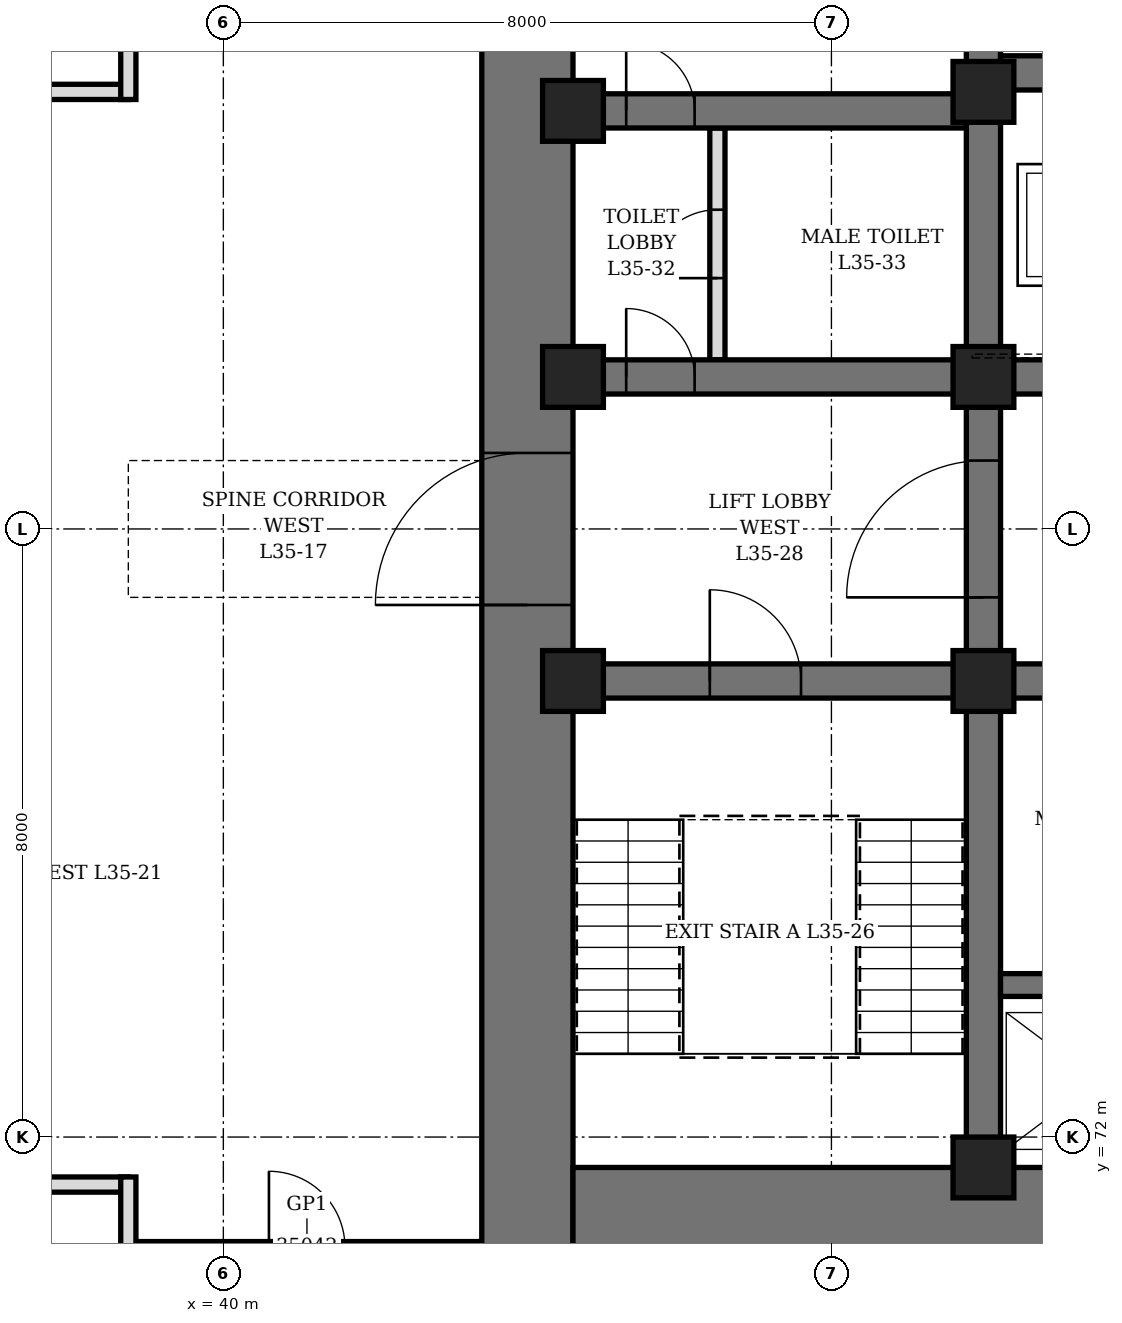
"""IFC4 building model, lengths in metres.
Left out: names, types, materials, properties, quantities, classifications, styles, units other than length and angle.
Written with IfcOpenShell. Run it as: python <this file> out.ifc"""

import sys

from ifc_helpers import new_model, si_unit, direction, frame, frame_2d, origin, origin_2d, place, context, subcontext, project, spatial, rectangle, hollow_rectangle, extrude, element, fill, save


model = new_model("IFC4")
c1 = context("Model", 3, precision=1e-05, world=origin(), true_north=direction((0.0, 1.0)))
c2 = subcontext(c1, "Body", "Model", "MODEL_VIEW")
j1 = project(units=[si_unit("LENGTHUNIT", "METRE"), si_unit("PLANEANGLEUNIT", "RADIAN")], contexts=[c1])
p1 = place(None, origin())
s1 = spatial("IfcSite", under=j1, at=p1, CompositionType="ELEMENT")
p2 = place(p1, origin())
s2 = spatial("IfcBuilding", under=s1, at=p2, CompositionType="ELEMENT")
p3 = place(p2, frame((0.0, 0.0, 158.5)))
s3 = spatial("IfcBuildingStorey", under=s2, at=p3, CompositionType="ELEMENT", Elevation=158.5)
p4 = place(p3, frame((44.0, 70.4, 0.0), z_axis=(0.0, 0.0, 1.0), x_axis=(0.0, 1.0, 0.0)))
e1 = element("IfcWall", 1, at=p4, inside=s3, PredefinedType="SHEAR", context=c2, shape_type="SweptSolid", body=[
    extrude(rectangle(XDim=19.2, YDim=1.2, at=frame_2d((9.6, 0.0))), origin(), (0.0, 0.0, 1.0), 4.2),
])
p5 = place(p4, frame((8.6, 0.0, 0.0)))
e2 = element("IfcOpeningElement", 2, at=p5, cuts=e1, PredefinedType="OPENING", context=c2, shape_type="SweptSolid", body=[
    extrude(rectangle(XDim=2.0, YDim=2.4, at=frame_2d((1.0, 1.2))), frame((0.0, 0.61, 0.0), z_axis=(0.0, -1.0, 0.0), x_axis=(1.0, 0.0, 0.0)), (0.0, 0.0, 1.0), 1.22),
])
p6 = place(p3, frame((44.6, 71.0, 0.0), z_axis=(0.0, 0.0, 1.0), x_axis=(1.0, 0.0, 0.0)))
e3 = element("IfcWall", 3, at=p6, inside=s3, PredefinedType="SHEAR", context=c2, shape_type="SweptSolid", body=[
    extrude(rectangle(XDim=22.8, YDim=1.2, at=frame_2d((11.4, 0.0))), origin(), (0.0, 0.0, 1.0), 4.2),
])
p7 = place(p3, frame((50.0, 71.6, 0.0), z_axis=(0.0, 0.0, 1.0), x_axis=(0.0, 1.0, 0.0)))
e4 = element("IfcWall", 4, at=p7, inside=s3, PredefinedType="SHEAR", context=c2, shape_type="SweptSolid", body=[
    extrude(rectangle(XDim=16.8, YDim=0.45, at=frame_2d((8.4, 0.0))), origin(), (0.0, 0.0, 1.0), 4.2),
])
p8 = place(p7, frame((7.5, 0.0, 0.0)))
e5 = element("IfcOpeningElement", 5, at=p8, cuts=e4, PredefinedType="OPENING", context=c2, shape_type="SweptSolid", body=[
    extrude(rectangle(XDim=1.8, YDim=2.4, at=frame_2d((0.9, 1.2))), frame((0.0, 0.235, 0.0), z_axis=(0.0, -1.0, 0.0), x_axis=(1.0, 0.0, 0.0)), (0.0, 0.0, 1.0), 0.47),
])
p9 = place(p3, frame((44.6, 78.0, 0.0), z_axis=(0.0, 0.0, 1.0), x_axis=(1.0, 0.0, 0.0)))
e6 = element("IfcWall", 6, at=p9, inside=s3, PredefinedType="SHEAR", context=c2, shape_type="SweptSolid", body=[
    extrude(rectangle(XDim=5.175, YDim=0.45, at=frame_2d((2.587, 0.0))), origin(), (0.0, 0.0, 1.0), 4.2),
])
p10 = place(p9, frame((1.8, 0.0, 0.0)))
e7 = element("IfcOpeningElement", 7, at=p10, cuts=e6, PredefinedType="OPENING", context=c2, shape_type="SweptSolid", body=[
    extrude(rectangle(XDim=1.2, YDim=2.1, at=frame_2d((0.6, 1.05))), frame((0.0, 0.235, 0.0), z_axis=(0.0, -1.0, 0.0), x_axis=(1.0, 0.0, 0.0)), (0.0, 0.0, 1.0), 0.47),
])
p11 = place(p3, frame((44.6, 82.0, 0.0), z_axis=(0.0, 0.0, 1.0), x_axis=(1.0, 0.0, 0.0)))
e8 = element("IfcWall", 8, at=p11, inside=s3, PredefinedType="SHEAR", context=c2, shape_type="SweptSolid", body=[
    extrude(rectangle(XDim=5.175, YDim=0.45, at=frame_2d((2.587, 0.0))), origin(), (0.0, 0.0, 1.0), 4.2),
])
p12 = place(p11, frame((0.7, 0.0, 0.0)))
e9 = element("IfcOpeningElement", 9, at=p12, cuts=e8, PredefinedType="OPENING", context=c2, shape_type="SweptSolid", body=[
    extrude(rectangle(XDim=0.9, YDim=2.1, at=frame_2d((0.45, 1.05))), frame((0.0, 0.235, 0.0), z_axis=(0.0, -1.0, 0.0), x_axis=(1.0, 0.0, 0.0)), (0.0, 0.0, 1.0), 0.47),
])
p13 = place(p3, frame((44.6, 85.5, 0.0), z_axis=(0.0, 0.0, 1.0), x_axis=(1.0, 0.0, 0.0)))
e10 = element("IfcWall", 10, at=p13, inside=s3, PredefinedType="SHEAR", context=c2, shape_type="SweptSolid", body=[
    extrude(rectangle(XDim=5.175, YDim=0.45, at=frame_2d((2.587, 0.0))), origin(), (0.0, 0.0, 1.0), 4.2),
])
p14 = place(p13, frame((0.7, 0.0, 0.0)))
e11 = element("IfcOpeningElement", 11, at=p14, cuts=e10, PredefinedType="OPENING", context=c2, shape_type="SweptSolid", body=[
    extrude(rectangle(XDim=0.9, YDim=2.1, at=frame_2d((0.45, 1.05))), frame((0.0, 0.235, 0.0), z_axis=(0.0, -1.0, 0.0), x_axis=(1.0, 0.0, 0.0)), (0.0, 0.0, 1.0), 0.47),
])
p15 = place(p3, frame((50.225, 78.0, 0.0), z_axis=(0.0, 0.0, 1.0), x_axis=(1.0, 0.0, 0.0)))
e12 = element("IfcWall", 12, at=p15, inside=s3, PredefinedType="SHEAR", context=c2, shape_type="SweptSolid", body=[
    extrude(rectangle(XDim=11.55, YDim=0.45, at=frame_2d((5.775, 0.0))), origin(), (0.0, 0.0, 1.0), 4.2),
])
p16 = place(p15, frame((0.825, 0.0, 0.0)))
e13 = element("IfcOpeningElement", 13, at=p16, cuts=e12, PredefinedType="OPENING", context=c2, shape_type="SweptSolid", body=[
    extrude(rectangle(XDim=0.9, YDim=2.1, at=frame_2d((0.45, 1.05))), frame((0.0, 0.235, 0.0), z_axis=(0.0, -1.0, 0.0), x_axis=(1.0, 0.0, 0.0)), (0.0, 0.0, 1.0), 0.47),
])
p17 = place(p15, frame((3.825, 0.0, 0.0)))
e14 = element("IfcOpeningElement", 14, at=p17, cuts=e12, PredefinedType="OPENING", context=c2, shape_type="SweptSolid", body=[
    extrude(rectangle(XDim=0.9, YDim=2.1, at=frame_2d((0.45, 1.05))), frame((0.0, 0.235, 0.0), z_axis=(0.0, -1.0, 0.0), x_axis=(1.0, 0.0, 0.0)), (0.0, 0.0, 1.0), 0.47),
])
p18 = place(p15, frame((6.825, 0.0, 0.0)))
e15 = element("IfcOpeningElement", 15, at=p18, cuts=e12, PredefinedType="OPENING", context=c2, shape_type="SweptSolid", body=[
    extrude(rectangle(XDim=0.9, YDim=2.1, at=frame_2d((0.45, 1.05))), frame((0.0, 0.235, 0.0), z_axis=(0.0, -1.0, 0.0), x_axis=(1.0, 0.0, 0.0)), (0.0, 0.0, 1.0), 0.47),
])
p19 = place(p15, frame((9.825, 0.0, 0.0)))
e16 = element("IfcOpeningElement", 16, at=p19, cuts=e12, PredefinedType="OPENING", context=c2, shape_type="SweptSolid", body=[
    extrude(rectangle(XDim=0.9, YDim=2.1, at=frame_2d((0.45, 1.05))), frame((0.0, 0.235, 0.0), z_axis=(0.0, -1.0, 0.0), x_axis=(1.0, 0.0, 0.0)), (0.0, 0.0, 1.0), 0.47),
])
p20 = place(p3, frame((50.225, 82.0, 0.0), z_axis=(0.0, 0.0, 1.0), x_axis=(1.0, 0.0, 0.0)))
e17 = element("IfcWall", 17, at=p20, inside=s3, PredefinedType="SHEAR", context=c2, shape_type="SweptSolid", body=[
    extrude(rectangle(XDim=11.55, YDim=0.45, at=frame_2d((5.775, 0.0))), origin(), (0.0, 0.0, 1.0), 4.2),
])
p21 = place(p20, frame((0.725, 0.0, 0.0)))
e18 = element("IfcOpeningElement", 18, at=p21, cuts=e17, PredefinedType="OPENING", context=c2, shape_type="SweptSolid", body=[
    extrude(rectangle(XDim=1.1, YDim=2.2, at=frame_2d((0.55, 1.1))), frame((0.0, 0.235, 0.0), z_axis=(0.0, -1.0, 0.0), x_axis=(1.0, 0.0, 0.0)), (0.0, 0.0, 1.0), 0.47),
])
p22 = place(p20, frame((3.725, 0.0, 0.0)))
e19 = element("IfcOpeningElement", 19, at=p22, cuts=e17, PredefinedType="OPENING", context=c2, shape_type="SweptSolid", body=[
    extrude(rectangle(XDim=1.1, YDim=2.2, at=frame_2d((0.55, 1.1))), frame((0.0, 0.235, 0.0), z_axis=(0.0, -1.0, 0.0), x_axis=(1.0, 0.0, 0.0)), (0.0, 0.0, 1.0), 0.47),
])
p23 = place(p20, frame((6.725, 0.0, 0.0)))
e20 = element("IfcOpeningElement", 20, at=p23, cuts=e17, PredefinedType="OPENING", context=c2, shape_type="SweptSolid", body=[
    extrude(rectangle(XDim=1.1, YDim=2.2, at=frame_2d((0.55, 1.1))), frame((0.0, 0.235, 0.0), z_axis=(0.0, -1.0, 0.0), x_axis=(1.0, 0.0, 0.0)), (0.0, 0.0, 1.0), 0.47),
])
p24 = place(p20, frame((9.725, 0.0, 0.0)))
e21 = element("IfcOpeningElement", 21, at=p24, cuts=e17, PredefinedType="OPENING", context=c2, shape_type="SweptSolid", body=[
    extrude(rectangle(XDim=1.1, YDim=2.2, at=frame_2d((0.55, 1.1))), frame((0.0, 0.235, 0.0), z_axis=(0.0, -1.0, 0.0), x_axis=(1.0, 0.0, 0.0)), (0.0, 0.0, 1.0), 0.47),
])
p25 = place(p3, frame((50.225, 86.0, 0.0), z_axis=(0.0, 0.0, 1.0), x_axis=(1.0, 0.0, 0.0)))
e22 = element("IfcWall", 22, at=p25, inside=s3, PredefinedType="SHEAR", context=c2, shape_type="SweptSolid", body=[
    extrude(rectangle(XDim=11.55, YDim=0.45, at=frame_2d((5.775, 0.0))), origin(), (0.0, 0.0, 1.0), 4.2),
])
p26 = place(p3, frame((50.225, 74.0, 0.0), z_axis=(0.0, 0.0, 1.0), x_axis=(1.0, 0.0, 0.0)))
e23 = element("IfcWall", 23, at=p26, inside=s3, PredefinedType="SHEAR", context=c2, shape_type="SweptSolid", body=[
    extrude(rectangle(XDim=11.55, YDim=0.3, at=frame_2d((5.775, 0.0))), origin(), (0.0, 0.0, 1.0), 4.2),
])
for number, where, z_axis, x_axis in (
    (24, (44.6, 78.0, 0.0), (0.0, 0.0, 1.0), (1.0, 0.0, 0.0)),
    (25, (44.6, 82.0, 0.0), (0.0, 0.0, 1.0), (1.0, 0.0, 0.0)),
    (26, (44.6, 85.5, 0.0), (0.0, 0.0, 1.0), (1.0, 0.0, 0.0)),
    (27, (50.0, 71.6, 0.0), (0.0, 0.0, 1.0), (1.0, 0.0, 0.0)),
    (28, (50.0, 78.0, 0.0), (0.0, 0.0, 1.0), (1.0, 0.0, 0.0)),
    (29, (50.0, 82.0, 0.0), (0.0, 0.0, 1.0), (1.0, 0.0, 0.0)),
    (30, (50.0, 85.75, 0.0), (0.0, 0.0, 1.0), (1.0, 0.0, 0.0)),
):
    element("IfcColumn", number, at=place(p3, frame(where, z_axis=z_axis, x_axis=x_axis)), inside=s3, PredefinedType="COLUMN", context=c2, shape_type="SweptSolid", body=[
        extrude(hollow_rectangle(XDim=0.8, YDim=0.8, WallThickness=0.1, at=origin_2d()), origin(), (0.0, 0.0, 1.0), 4.2),
    ])
p27 = place(p3, frame((46.5, 82.225, 0.0), z_axis=(0.0, 0.0, 1.0), x_axis=(0.0, 1.0, 0.0)))
e31 = element("IfcWall", 31, at=p27, inside=s3, PredefinedType="PARTITIONING", context=c2, shape_type="SweptSolid", body=[
    extrude(rectangle(XDim=3.05, YDim=0.2, at=frame_2d((1.525, 0.0))), origin(), (0.0, 0.0, 1.0), 4.04),
])
p28 = place(p27, frame((1.075, 0.0, 0.0)))
e32 = element("IfcOpeningElement", 32, at=p28, cuts=e31, PredefinedType="OPENING", context=c2, shape_type="SweptSolid", body=[
    extrude(rectangle(XDim=0.9, YDim=2.1, at=frame_2d((0.45, 1.05))), frame((0.0, 0.11, 0.0), z_axis=(0.0, -1.0, 0.0), x_axis=(1.0, 0.0, 0.0)), (0.0, 0.0, 1.0), 0.22),
])
for number, where, z_axis, x_axis in (
    (33, (33.95, 71.375, 0.0), (0.0, 0.0, 1.0), (1.0, 0.0, 0.0)),
    (34, (33.95, 85.75, 0.0), (0.0, 0.0, 1.0), (1.0, 0.0, 0.0)),
):
    element("IfcWall", number, at=place(p3, frame(where, z_axis=z_axis, x_axis=x_axis)), inside=s3, PredefinedType="PARTITIONING", context=c2, shape_type="SweptSolid", body=[
        extrude(rectangle(XDim=4.8, YDim=0.2, at=frame_2d((2.4, 0.0))), origin(), (0.0, 0.0, 1.0), 3.428),
    ])
p29 = place(p3, frame((38.8, 70.55, 0.0), z_axis=(0.0, 0.0, 1.0), x_axis=(1.0, 0.0, 0.0)))
e35 = element("IfcWall", 35, at=p29, inside=s3, PredefinedType="PARTITIONING", context=c2, shape_type="SweptSolid", body=[
    extrude(rectangle(XDim=4.6, YDim=0.15, at=frame_2d((2.3, 0.0))), origin(), (0.0, 0.0, 1.0), 4.04),
])
p30 = place(p29, frame((1.8, 0.0, 0.0)))
e36 = element("IfcOpeningElement", 36, at=p30, cuts=e35, PredefinedType="OPENING", context=c2, shape_type="SweptSolid", body=[
    extrude(rectangle(XDim=1.0, YDim=2.4, at=frame_2d((0.5, 1.2))), frame((0.0, 0.085, 0.0), z_axis=(0.0, -1.0, 0.0), x_axis=(1.0, 0.0, 0.0)), (0.0, 0.0, 1.0), 0.17),
])
p31 = place(p3, frame((38.75, 63.2, 0.0), z_axis=(0.0, 0.0, 1.0), x_axis=(0.0, 1.0, 0.0)))
e37 = element("IfcWall", 37, at=p31, inside=s3, PredefinedType="PARTITIONING", context=c2, shape_type="SweptSolid", body=[
    extrude(rectangle(XDim=8.275, YDim=0.2, at=frame_2d((4.138, 0.0))), origin(), (0.0, 0.0, 1.0), 4.04),
])
p32 = place(p31, frame((0.488, 0.0, 0.0)))
e38 = element("IfcOpeningElement", 38, at=p32, cuts=e37, PredefinedType="OPENING", context=c2, shape_type="SweptSolid", body=[
    extrude(rectangle(XDim=1.0, YDim=2.1, at=frame_2d((0.5, 1.05))), frame((0.0, 0.11, 0.0), z_axis=(0.0, -1.0, 0.0), x_axis=(1.0, 0.0, 0.0)), (0.0, 0.0, 1.0), 0.22),
])
p33 = place(p31, frame((6.05, 0.0, 0.0)))
e39 = element("IfcOpeningElement", 39, at=p33, cuts=e37, PredefinedType="OPENING", context=c2, shape_type="SweptSolid", body=[
    extrude(rectangle(XDim=1.0, YDim=2.1, at=frame_2d((0.5, 1.05))), frame((0.0, 0.11, 0.0), z_axis=(0.0, -1.0, 0.0), x_axis=(1.0, 0.0, 0.0)), (0.0, 0.0, 1.0), 0.22),
])
p34 = place(p3, frame((38.75, 85.65, 0.0), z_axis=(0.0, 0.0, 1.0), x_axis=(0.0, 1.0, 0.0)))
e40 = element("IfcWall", 40, at=p34, inside=s3, PredefinedType="PARTITIONING", context=c2, shape_type="SweptSolid", body=[
    extrude(rectangle(XDim=8.725, YDim=0.2, at=frame_2d((4.363, 0.0))), origin(), (0.0, 0.0, 1.0), 4.04),
])
p35 = place(p34, frame((1.038, 0.0, 0.0)))
e41 = element("IfcOpeningElement", 41, at=p35, cuts=e40, PredefinedType="OPENING", context=c2, shape_type="SweptSolid", body=[
    extrude(rectangle(XDim=1.0, YDim=2.1, at=frame_2d((0.5, 1.05))), frame((0.0, 0.11, 0.0), z_axis=(0.0, -1.0, 0.0), x_axis=(1.0, 0.0, 0.0)), (0.0, 0.0, 1.0), 0.22),
])
p36 = place(p34, frame((6.788, 0.0, 0.0)))
e42 = element("IfcOpeningElement", 42, at=p36, cuts=e40, PredefinedType="OPENING", context=c2, shape_type="SweptSolid", body=[
    extrude(rectangle(XDim=1.0, YDim=2.1, at=frame_2d((0.5, 1.05))), frame((0.0, 0.11, 0.0), z_axis=(0.0, -1.0, 0.0), x_axis=(1.0, 0.0, 0.0)), (0.0, 0.0, 1.0), 0.22),
])
p37 = place(p12, origin())
e43 = element("IfcDoor", 43, at=p37, inside=s3, OperationType="SINGLE_SWING_LEFT", PredefinedType="DOOR", context=c2, shape_type="SweptSolid", body=[
    extrude(rectangle(XDim=0.9, YDim=2.1, at=frame_2d((0.45, 1.05))), frame((0.0, 0.225, 0.0), z_axis=(0.0, -1.0, 0.0), x_axis=(1.0, 0.0, 0.0)), (0.0, 0.0, 1.0), 0.449),
])
fill(e9, e43)
p38 = place(p28, origin())
e44 = element("IfcDoor", 44, at=p38, inside=s3, OperationType="SINGLE_SWING_RIGHT", PredefinedType="DOOR", context=c2, shape_type="SweptSolid", body=[
    extrude(rectangle(XDim=0.9, YDim=2.1, at=frame_2d((0.45, 1.05))), frame((0.0, 0.1, 0.0), z_axis=(0.0, -1.0, 0.0), x_axis=(1.0, 0.0, 0.0)), (0.0, 0.0, 1.0), 0.199),
])
fill(e32, e44)
p39 = place(p14, origin())
e45 = element("IfcDoor", 45, at=p39, inside=s3, OperationType="SINGLE_SWING_RIGHT", PredefinedType="DOOR", context=c2, shape_type="SweptSolid", body=[
    extrude(rectangle(XDim=0.9, YDim=2.1, at=frame_2d((0.45, 1.05))), frame((0.0, 0.225, 0.0), z_axis=(0.0, -1.0, 0.0), x_axis=(1.0, 0.0, 0.0)), (0.0, 0.0, 1.0), 0.449),
])
fill(e11, e45)
p40 = place(p10, origin())
e46 = element("IfcDoor", 46, at=p40, inside=s3, OperationType="SINGLE_SWING_LEFT", PredefinedType="DOOR", context=c2, shape_type="SweptSolid", body=[
    extrude(rectangle(XDim=1.2, YDim=2.1, at=frame_2d((0.6, 1.05))), frame((0.0, 0.225, 0.0), z_axis=(0.0, -1.0, 0.0), x_axis=(1.0, 0.0, 0.0)), (0.0, 0.0, 1.0), 0.449),
])
fill(e7, e46)
p41 = place(p5, origin())
e47 = element("IfcDoor", 47, at=p41, inside=s3, OperationType="DOUBLE_DOOR_SINGLE_SWING", PredefinedType="DOOR", context=c2, shape_type="SweptSolid", body=[
    extrude(rectangle(XDim=2.0, YDim=2.4, at=frame_2d((1.0, 1.2))), frame((0.0, 0.35, 0.0), z_axis=(0.0, -1.0, 0.0), x_axis=(1.0, 0.0, 0.0)), (0.0, 0.0, 1.0), 0.7),
])
fill(e2, e47)
p42 = place(p8, origin())
e48 = element("IfcDoor", 48, at=p42, inside=s3, OperationType="DOUBLE_DOOR_SINGLE_SWING", PredefinedType="DOOR", context=c2, shape_type="SweptSolid", body=[
    extrude(rectangle(XDim=1.8, YDim=2.4, at=frame_2d((0.9, 1.2))), frame((0.0, 0.225, 0.0), z_axis=(0.0, -1.0, 0.0), x_axis=(1.0, 0.0, 0.0)), (0.0, 0.0, 1.0), 0.449),
])
fill(e5, e48)
p43 = place(p30, origin())
e49 = element("IfcDoor", 49, at=p43, inside=s3, OperationType="SINGLE_SWING_RIGHT", PredefinedType="DOOR", context=c2, shape_type="SweptSolid", body=[
    extrude(rectangle(XDim=1.0, YDim=2.4, at=frame_2d((0.5, 1.2))), frame((0.0, 0.075, 0.0), z_axis=(0.0, -1.0, 0.0), x_axis=(1.0, 0.0, 0.0)), (0.0, 0.0, 1.0), 0.149),
])
fill(e36, e49)
save(model, sys.argv[1])
